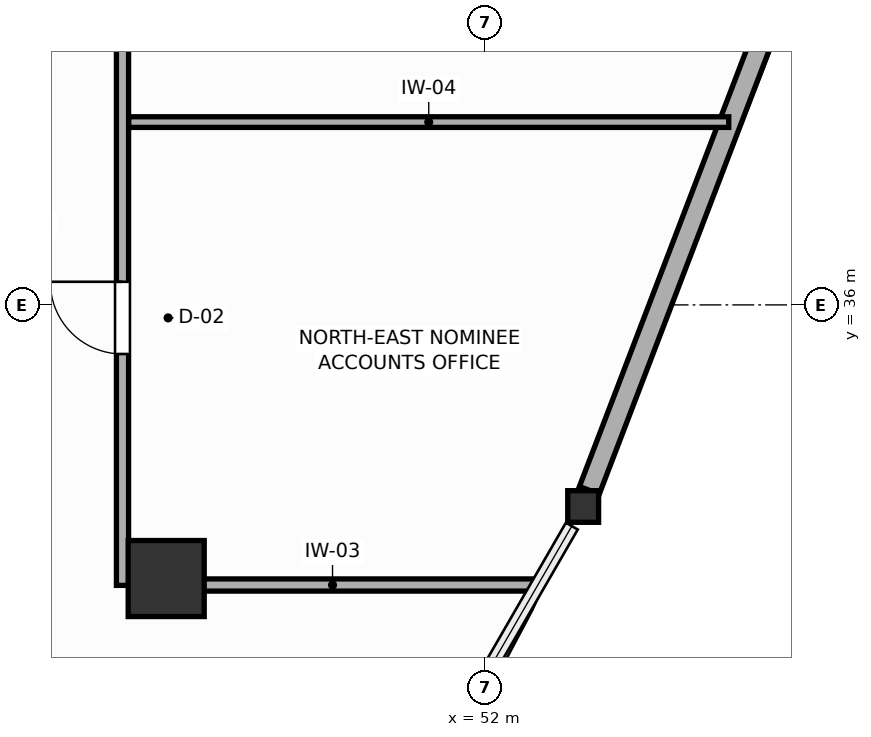
"""IFC4 building model, lengths in metres.
Left out: names, types, materials, properties, quantities, classifications, styles, units other than length and angle.
Written with IfcOpenShell. Run it as: python <this file> out.ifc"""

import sys

from ifc_helpers import new_model, si_unit, direction, frame, frame_2d, origin, origin_2d, place, context, subcontext, project, spatial, rectangle, i_section, extrude, source, transform, mapped, element, fill, save


model = new_model("IFC4")
c1 = context("Model", 3, precision=1e-05, world=origin(), true_north=direction((0.0, 1.0)))
c2 = subcontext(c1, "Body", "Model", "MODEL_VIEW")
j1 = project(units=[si_unit("LENGTHUNIT", "METRE"), si_unit("PLANEANGLEUNIT", "RADIAN")], contexts=[c1])
p1 = place(None, origin())
s1 = spatial("IfcSite", under=j1, at=p1, CompositionType="ELEMENT")
p2 = place(p1, origin())
s2 = spatial("IfcBuilding", under=s1, at=p2, CompositionType="ELEMENT")
p3 = place(p2, frame((0.0, 0.0, 172.2)))
s3 = spatial("IfcBuildingStorey", under=s2, at=p3, CompositionType="ELEMENT", Elevation=172.2)
m1 = source(origin(), c2, "Body", "SweptSolid", [
    extrude(rectangle(XDim=1.0, YDim=1.0, at=origin_2d()), origin(), (0.0, 0.0, 1.0), 3.6),
])
p4 = place(p3, frame((47.8, 32.4, 0.0), z_axis=(0.0, 0.0, 1.0), x_axis=(1.0, 0.0, 0.0)))
e1 = element("IfcColumn", 1, at=p4, inside=s3, PredefinedType="COLUMN", context=c2, shape_type="MappedRepresentation", body=[
    mapped(m1, transform((0.0, 0.0, 0.0), scale=1.0)),
])
m2 = source(origin(), c2, "Body", "SweptSolid", [
    extrude(i_section(OverallWidth=0.406, OverallDepth=0.416, WebThickness=0.027, FlangeThickness=0.044, FilletRadius=0.015, at=origin_2d()), origin(), (0.0, 0.0, 1.0), 3.6),
])
p5 = place(p3, frame((53.286, 33.348, 0.0), z_axis=(0.0, 0.0, 1.0), x_axis=(1.0, 0.0, 0.0)))
e2 = element("IfcColumn", 2, at=p5, inside=s3, PredefinedType="COLUMN", context=c2, shape_type="MappedRepresentation", body=[
    mapped(m2, transform((0.0, 0.0, 0.0), scale=1.0)),
])
p6 = place(p3, frame((53.367, 33.561, 0.0), z_axis=(0.0, 0.0, 1.0), x_axis=(0.357407179744, 0.933948664471, 0.0)))
e3 = element("IfcWall", 3, at=p6, inside=s3, PredefinedType="SOLIDWALL", context=c2, shape_type="SweptSolid", body=[
    extrude(rectangle(XDim=14.284, YDim=0.28, at=frame_2d((7.142, 0.0))), origin(), (0.0, 0.0, 1.0), 3.01),
])
p7 = place(p3, frame((47.225, 32.31, 0.0), z_axis=(0.0, 0.0, 1.0), x_axis=(0.0, 1.0, 0.0)))
e4 = element("IfcWall", 4, at=p7, inside=s3, PredefinedType="PARTITIONING", context=c2, shape_type="SweptSolid", body=[
    extrude(rectangle(XDim=19.188, YDim=0.16, at=frame_2d((9.594, 0.0))), origin(), (0.0, 0.0, 1.0), 3.4),
])
p8 = place(p7, frame((3.044, 0.0, 0.0)))
e5 = element("IfcOpeningElement", 5, at=p8, cuts=e4, PredefinedType="OPENING", context=c2, shape_type="SweptSolid", body=[
    extrude(rectangle(XDim=0.95, YDim=2.05, at=frame_2d((0.475, 1.025))), frame((0.0, 0.09, 0.0), z_axis=(0.0, -1.0, 0.0), x_axis=(1.0, 0.0, 0.0)), (0.0, 0.0, 1.0), 0.18),
])
p9 = place(p7, frame((11.463, 0.0, 0.0)))
e6 = element("IfcOpeningElement", 6, at=p9, cuts=e4, PredefinedType="OPENING", context=c2, shape_type="SweptSolid", body=[
    extrude(rectangle(XDim=0.95, YDim=2.05, at=frame_2d((0.475, 1.025))), frame((0.0, 0.09, 0.0), z_axis=(0.0, -1.0, 0.0), x_axis=(1.0, 0.0, 0.0)), (0.0, 0.0, 1.0), 0.18),
])
p10 = place(p3, frame((47.307, 32.315, 0.0), z_axis=(0.0, 0.0, 1.0), x_axis=(1.0, 0.0, 0.0)))
e7 = element("IfcWall", 7, at=p10, inside=s3, PredefinedType="PARTITIONING", context=c2, shape_type="SweptSolid", body=[
    extrude(rectangle(XDim=5.362, YDim=0.16, at=frame_2d((2.681, 0.0))), origin(), (0.0, 0.0, 1.0), 2.95),
])
p11 = place(p3, frame((47.307, 38.405, 0.0), z_axis=(0.0, 0.0, 1.0), x_axis=(1.0, 0.0, 0.0)))
e8 = element("IfcWall", 8, at=p11, inside=s3, PredefinedType="PARTITIONING", context=c2, shape_type="SweptSolid", body=[
    extrude(rectangle(XDim=7.894, YDim=0.14, at=frame_2d((3.947, 0.0))), origin(), (0.0, 0.0, 1.0), 3.4),
])
p12 = place(p8, origin())
e9 = element("IfcDoor", 9, at=p12, inside=s3, OperationType="SINGLE_SWING_RIGHT", PredefinedType="DOOR", context=c2, shape_type="SweptSolid", body=[
    extrude(rectangle(XDim=0.95, YDim=2.05, at=frame_2d((0.475, 1.025))), frame((0.0, 0.025, 0.0), z_axis=(0.0, -1.0, 0.0), x_axis=(1.0, 0.0, 0.0)), (0.0, 0.0, 1.0), 0.05),
])
fill(e5, e9)
save(model, sys.argv[1])
